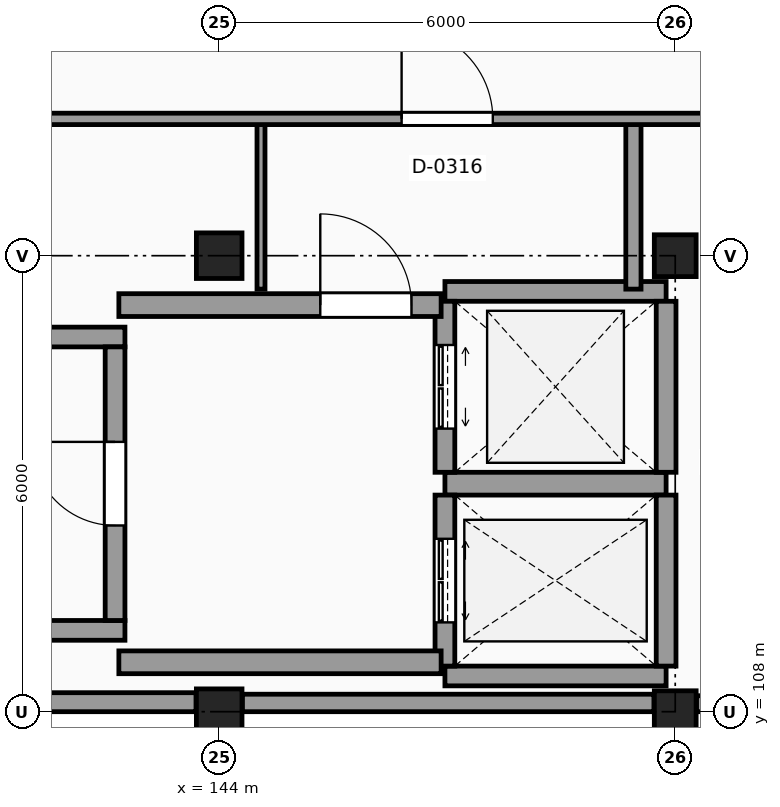
"""IFC4 building model, lengths in metres.
Left out: names, types, materials, properties, quantities, classifications, styles, units other than length and angle.
Written with IfcOpenShell. Run it as: python <this file> out.ifc"""

import sys

from ifc_helpers import new_model, si_unit, direction, frame, frame_2d, origin, origin_2d, place, context, subcontext, project, spatial, rectangle, extrude, element, fill, save


model = new_model("IFC4")
c1 = context("Model", 3, precision=1e-05, world=origin(), true_north=direction((0.0, 1.0)))
c2 = subcontext(c1, "Body", "Model", "MODEL_VIEW")
j1 = project(units=[si_unit("LENGTHUNIT", "METRE"), si_unit("PLANEANGLEUNIT", "RADIAN")], contexts=[c1])
p1 = place(None, origin())
s1 = spatial("IfcSite", under=j1, at=p1, CompositionType="ELEMENT")
p2 = place(p1, origin())
s2 = spatial("IfcBuilding", under=s1, at=p2, CompositionType="ELEMENT")
p3 = place(p2, frame((0.0, 0.0, 31.5)))
s3 = spatial("IfcBuildingStorey", under=s2, at=p3, CompositionType="ELEMENT", Elevation=31.5)
for number, where, z_axis, x_axis in (
    (1, (144.0, 108.0, 0.0), (0.0, 0.0, 1.0), (1.0, 0.0, 0.0)),
    (2, (144.0, 114.0, 0.0), (0.0, 0.0, 1.0), (1.0, 0.0, 0.0)),
):
    element("IfcColumn", number, at=place(p3, frame(where, z_axis=z_axis, x_axis=x_axis)), inside=s3, PredefinedType="COLUMN", context=c2, shape_type="SweptSolid", body=[
        extrude(rectangle(XDim=0.6, YDim=0.6, at=origin_2d()), origin(), (0.0, 0.0, 1.0), 3.3),
    ])
for number, where, z_axis, x_axis in (
    (3, (150.0, 108.0, 0.0), (0.0, 0.0, 1.0), (1.0, 0.0, 0.0)),
    (4, (150.0, 114.0, 0.0), (0.0, 0.0, 1.0), (1.0, 0.0, 0.0)),
):
    element("IfcColumn", number, at=place(p3, frame(where, z_axis=z_axis, x_axis=x_axis)), inside=s3, PredefinedType="COLUMN", context=c2, shape_type="SweptSolid", body=[
        extrude(rectangle(XDim=0.55, YDim=0.55, at=origin_2d()), origin(), (0.0, 0.0, 1.0), 3.3),
    ])
p4 = place(p3, frame((138.28, 108.125, 0.0), z_axis=(0.0, 0.0, 1.0), x_axis=(1.0, 0.0, 0.0)))
e5 = element("IfcWall", 5, at=p4, inside=s3, PredefinedType="SOLIDWALL", context=c2, shape_type="SweptSolid", body=[
    extrude(rectangle(XDim=5.415, YDim=0.25, at=frame_2d((2.708, 0.0))), origin(), (0.0, 0.0, 1.0), 2.42),
])
p5 = place(p3, frame((144.305, 108.115, 0.0), z_axis=(0.0, 0.0, 1.0), x_axis=(1.0, 0.0, 0.0)))
e6 = element("IfcWall", 6, at=p5, inside=s3, PredefinedType="SOLIDWALL", context=c2, shape_type="SweptSolid", body=[
    extrude(rectangle(XDim=5.415, YDim=0.23, at=frame_2d((2.708, 0.0))), origin(), (0.0, 0.0, 1.0), 2.42),
])
p6 = place(p3, frame((150.28, 108.105, 0.0), z_axis=(0.0, 0.0, 1.0), x_axis=(1.0, 0.0, 0.0)))
e7 = element("IfcWall", 7, at=p6, inside=s3, PredefinedType="SOLIDWALL", context=c2, shape_type="SweptSolid", body=[
    extrude(rectangle(XDim=5.415, YDim=0.21, at=frame_2d((2.708, 0.0))), origin(), (0.0, 0.0, 1.0), 2.42),
])
p7 = place(p6, frame((2.008, 0.0, 0.8)))
e8 = element("IfcOpeningElement", 8, at=p7, cuts=e7, PredefinedType="OPENING", context=c2, shape_type="SweptSolid", body=[
    extrude(rectangle(XDim=1.4, YDim=1.4, at=frame_2d((0.7, 0.7))), frame((0.0, 0.115, 0.0), z_axis=(0.0, -1.0, 0.0), x_axis=(1.0, 0.0, 0.0)), (0.0, 0.0, 1.0), 0.23),
])
for number, where, z_axis, x_axis in (
    (9, (132.04, 109.07, 0.0), (0.0, 0.0, 1.0), (1.0, 0.0, 0.0)),
    (10, (132.04, 112.93, 0.0), (0.0, 0.0, 1.0), (1.0, 0.0, 0.0)),
):
    element("IfcWall", number, at=place(p3, frame(where, z_axis=z_axis, x_axis=x_axis)), inside=s3, PredefinedType="SHEAR", context=c2, shape_type="SweptSolid", body=[
        extrude(rectangle(XDim=10.72, YDim=0.26, at=frame_2d((5.36, 0.0))), origin(), (0.0, 0.0, 1.0), 3.3),
    ])
p8 = place(p3, frame((142.63, 109.2, 0.0), z_axis=(0.0, 0.0, 1.0), x_axis=(0.0, 1.0, 0.0)))
e11 = element("IfcWall", 11, at=p8, inside=s3, PredefinedType="SHEAR", context=c2, shape_type="SweptSolid", body=[
    extrude(rectangle(XDim=3.6, YDim=0.26, at=frame_2d((1.8, 0.0))), origin(), (0.0, 0.0, 1.0), 3.3),
])
p9 = place(p8, frame((1.25, 0.0, 0.0)))
e12 = element("IfcOpeningElement", 12, at=p9, cuts=e11, PredefinedType="OPENING", context=c2, shape_type="SweptSolid", body=[
    extrude(rectangle(XDim=1.1, YDim=2.15, at=frame_2d((0.55, 1.075))), frame((0.0, 0.14, 0.0), z_axis=(0.0, -1.0, 0.0), x_axis=(1.0, 0.0, 0.0)), (0.0, 0.0, 1.0), 0.28),
])
p10 = place(p3, frame((146.97, 108.47, 0.0), z_axis=(0.0, 0.0, 1.0), x_axis=(1.0, 0.0, 0.0)))
e13 = element("IfcWall", 13, at=p10, inside=s3, PredefinedType="SHEAR", context=c2, shape_type="SweptSolid", body=[
    extrude(rectangle(XDim=2.91, YDim=0.26, at=frame_2d((1.455, 0.0))), origin(), (0.0, 0.0, 1.0), 3.3),
])
p11 = place(p3, frame((146.97, 111.0, 0.0), z_axis=(0.0, 0.0, 1.0), x_axis=(1.0, 0.0, 0.0)))
e14 = element("IfcWall", 14, at=p11, inside=s3, PredefinedType="SHEAR", context=c2, shape_type="SweptSolid", body=[
    extrude(rectangle(XDim=2.91, YDim=0.3, at=frame_2d((1.455, 0.0))), origin(), (0.0, 0.0, 1.0), 3.3),
])
p12 = place(p3, frame((149.88, 108.6, 0.0), z_axis=(0.0, 0.0, 1.0), x_axis=(0.0, 1.0, 0.0)))
e15 = element("IfcWall", 15, at=p12, inside=s3, PredefinedType="SHEAR", context=c2, shape_type="SweptSolid", body=[
    extrude(rectangle(XDim=2.25, YDim=0.26, at=frame_2d((1.125, 0.0))), origin(), (0.0, 0.0, 1.0), 3.3),
])
p13 = place(p3, frame((146.97, 108.6, 0.0), z_axis=(0.0, 0.0, 1.0), x_axis=(0.0, 1.0, 0.0)))
e16 = element("IfcWall", 16, at=p13, inside=s3, PredefinedType="SHEAR", context=c2, shape_type="SweptSolid", body=[
    extrude(rectangle(XDim=2.25, YDim=0.26, at=frame_2d((1.125, 0.0))), origin(), (0.0, 0.0, 1.0), 3.3),
])
p14 = place(p13, frame((0.575, 0.0, 0.0)))
e17 = element("IfcOpeningElement", 17, at=p14, cuts=e16, PredefinedType="OPENING", context=c2, shape_type="SweptSolid", body=[
    extrude(rectangle(XDim=1.1, YDim=2.2, at=frame_2d((0.55, 1.1))), frame((0.0, 0.14, 0.0), z_axis=(0.0, -1.0, 0.0), x_axis=(1.0, 0.0, 0.0)), (0.0, 0.0, 1.0), 0.28),
])
p15 = place(p3, frame((146.97, 113.53, 0.0), z_axis=(0.0, 0.0, 1.0), x_axis=(1.0, 0.0, 0.0)))
e18 = element("IfcWall", 18, at=p15, inside=s3, PredefinedType="SHEAR", context=c2, shape_type="SweptSolid", body=[
    extrude(rectangle(XDim=2.91, YDim=0.26, at=frame_2d((1.455, 0.0))), origin(), (0.0, 0.0, 1.0), 3.3),
])
p16 = place(p3, frame((149.88, 111.15, 0.0), z_axis=(0.0, 0.0, 1.0), x_axis=(0.0, 1.0, 0.0)))
e19 = element("IfcWall", 19, at=p16, inside=s3, PredefinedType="SHEAR", context=c2, shape_type="SweptSolid", body=[
    extrude(rectangle(XDim=2.25, YDim=0.26, at=frame_2d((1.125, 0.0))), origin(), (0.0, 0.0, 1.0), 3.3),
])
p17 = place(p3, frame((146.97, 111.15, 0.0), z_axis=(0.0, 0.0, 1.0), x_axis=(0.0, 1.0, 0.0)))
e20 = element("IfcWall", 20, at=p17, inside=s3, PredefinedType="SHEAR", context=c2, shape_type="SweptSolid", body=[
    extrude(rectangle(XDim=2.25, YDim=0.26, at=frame_2d((1.125, 0.0))), origin(), (0.0, 0.0, 1.0), 3.3),
])
p18 = place(p17, frame((0.575, 0.0, 0.0)))
e21 = element("IfcOpeningElement", 21, at=p18, cuts=e20, PredefinedType="OPENING", context=c2, shape_type="SweptSolid", body=[
    extrude(rectangle(XDim=1.1, YDim=2.2, at=frame_2d((0.55, 1.1))), frame((0.0, 0.14, 0.0), z_axis=(0.0, -1.0, 0.0), x_axis=(1.0, 0.0, 0.0)), (0.0, 0.0, 1.0), 0.28),
])
p19 = place(p3, frame((142.68, 113.35, 0.0), z_axis=(0.0, 0.0, 1.0), x_axis=(1.0, 0.0, 0.0)))
e22 = element("IfcWall", 22, at=p19, inside=s3, PredefinedType="SHEAR", context=c2, shape_type="SweptSolid", body=[
    extrude(rectangle(XDim=4.24, YDim=0.3, at=frame_2d((2.12, 0.0))), origin(), (0.0, 0.0, 1.0), 3.3),
])
p20 = place(p19, frame((2.65, 0.0, 0.0)))
e23 = element("IfcOpeningElement", 23, at=p20, cuts=e22, PredefinedType="OPENING", context=c2, shape_type="SweptSolid", body=[
    extrude(rectangle(XDim=1.2, YDim=2.2, at=frame_2d((0.6, 1.1))), frame((0.0, 0.16, 0.0), z_axis=(0.0, -1.0, 0.0), x_axis=(1.0, 0.0, 0.0)), (0.0, 0.0, 1.0), 0.32),
])
p21 = place(p3, frame((142.68, 108.65, 0.0), z_axis=(0.0, 0.0, 1.0), x_axis=(1.0, 0.0, 0.0)))
e24 = element("IfcWall", 24, at=p21, inside=s3, PredefinedType="SHEAR", context=c2, shape_type="SweptSolid", body=[
    extrude(rectangle(XDim=4.24, YDim=0.3, at=frame_2d((2.12, 0.0))), origin(), (0.0, 0.0, 1.0), 3.3),
])
p22 = place(p3, frame((144.55, 113.56, 0.0), z_axis=(0.0, 0.0, 1.0), x_axis=(0.0, 1.0, 0.0)))
e25 = element("IfcWall", 25, at=p22, inside=s3, PredefinedType="PARTITIONING", context=c2, shape_type="SweptSolid", body=[
    extrude(rectangle(XDim=2.24, YDim=0.105, at=frame_2d((1.12, 0.0))), origin(), (0.0, 0.0, 1.0), 3.07),
])
p23 = place(p3, frame((149.45, 113.56, 0.0), z_axis=(0.0, 0.0, 1.0), x_axis=(0.0, 1.0, 0.0)))
e26 = element("IfcWall", 26, at=p23, inside=s3, PredefinedType="PARTITIONING", context=c2, shape_type="SweptSolid", body=[
    extrude(rectangle(XDim=2.24, YDim=0.2, at=frame_2d((1.12, 0.0))), origin(), (0.0, 0.0, 1.0), 3.07),
])
p24 = place(p3, frame((66.215, 115.8, 0.0), z_axis=(0.0, 0.0, 1.0), x_axis=(1.0, 0.0, 0.0)))
e27 = element("IfcWall", 27, at=p24, inside=s3, PredefinedType="PARTITIONING", context=c2, shape_type="SweptSolid", body=[
    extrude(rectangle(XDim=103.585, YDim=0.15, at=frame_2d((51.792, 0.0))), origin(), (0.0, 0.0, 1.0), 3.07),
])
p25 = place(p24, frame((80.185, 0.0, 0.0)))
e28 = element("IfcOpeningElement", 28, at=p25, cuts=e27, PredefinedType="OPENING", context=c2, shape_type="SweptSolid", body=[
    extrude(rectangle(XDim=1.2, YDim=2.2, at=frame_2d((0.6, 1.1))), frame((0.0, 0.085, 0.0), z_axis=(0.0, -1.0, 0.0), x_axis=(1.0, 0.0, 0.0)), (0.0, 0.0, 1.0), 0.17),
])
p26 = place(p24, frame((50.185, 0.0, 0.0)))
e29 = element("IfcOpeningElement", 29, at=p26, cuts=e27, PredefinedType="OPENING", context=c2, shape_type="SweptSolid", body=[
    extrude(rectangle(XDim=1.2, YDim=2.2, at=frame_2d((0.6, 1.1))), frame((0.0, 0.085, 0.0), z_axis=(0.0, -1.0, 0.0), x_axis=(1.0, 0.0, 0.0)), (0.0, 0.0, 1.0), 0.17),
])
p27 = place(p24, frame((9.035, 0.0, 0.0)))
e30 = element("IfcOpeningElement", 30, at=p27, cuts=e27, PredefinedType="OPENING", context=c2, shape_type="SweptSolid", body=[
    extrude(rectangle(XDim=1.1, YDim=2.15, at=frame_2d((0.55, 1.075))), frame((0.0, 0.085, 0.0), z_axis=(0.0, -1.0, 0.0), x_axis=(1.0, 0.0, 0.0)), (0.0, 0.0, 1.0), 0.17),
])
p28 = place(p24, frame((55.335, 0.0, 0.0)))
e31 = element("IfcOpeningElement", 31, at=p28, cuts=e27, PredefinedType="OPENING", context=c2, shape_type="SweptSolid", body=[
    extrude(rectangle(XDim=1.0, YDim=2.15, at=frame_2d((0.5, 1.075))), frame((0.0, 0.085, 0.0), z_axis=(0.0, -1.0, 0.0), x_axis=(1.0, 0.0, 0.0)), (0.0, 0.0, 1.0), 0.17),
])
p29 = place(p24, frame((62.305, 0.0, 0.0)))
e32 = element("IfcOpeningElement", 32, at=p29, cuts=e27, PredefinedType="OPENING", context=c2, shape_type="SweptSolid", body=[
    extrude(rectangle(XDim=0.96, YDim=2.15, at=frame_2d((0.48, 1.075))), frame((0.0, 0.085, 0.0), z_axis=(0.0, -1.0, 0.0), x_axis=(1.0, 0.0, 0.0)), (0.0, 0.0, 1.0), 0.17),
])
p30 = place(p24, frame((31.985, 0.0, 0.0)))
e33 = element("IfcOpeningElement", 33, at=p30, cuts=e27, PredefinedType="OPENING", context=c2, shape_type="SweptSolid", body=[
    extrude(rectangle(XDim=1.6, YDim=2.25, at=frame_2d((0.8, 1.125))), frame((0.0, 0.085, 0.0), z_axis=(0.0, -1.0, 0.0), x_axis=(1.0, 0.0, 0.0)), (0.0, 0.0, 1.0), 0.17),
])
p31 = place(p24, frame((18.61, 0.0, 0.0)))
e34 = element("IfcOpeningElement", 34, at=p31, cuts=e27, PredefinedType="OPENING", context=c2, shape_type="SweptSolid", body=[
    extrude(rectangle(XDim=0.95, YDim=2.1, at=frame_2d((0.475, 1.05))), frame((0.0, 0.085, 0.0), z_axis=(0.0, -1.0, 0.0), x_axis=(1.0, 0.0, 0.0)), (0.0, 0.0, 1.0), 0.17),
])
p32 = place(p24, frame((84.51, 0.0, 0.0)))
e35 = element("IfcOpeningElement", 35, at=p32, cuts=e27, PredefinedType="OPENING", context=c2, shape_type="SweptSolid", body=[
    extrude(rectangle(XDim=0.95, YDim=2.1, at=frame_2d((0.475, 1.05))), frame((0.0, 0.085, 0.0), z_axis=(0.0, -1.0, 0.0), x_axis=(1.0, 0.0, 0.0)), (0.0, 0.0, 1.0), 0.17),
])
p33 = place(p9, origin())
e36 = element("IfcDoor", 36, at=p33, inside=s3, OperationType="SINGLE_SWING_RIGHT", PredefinedType="DOOR", context=c2, shape_type="SweptSolid", body=[
    extrude(rectangle(XDim=1.1, YDim=2.15, at=frame_2d((0.55, 1.075))), frame((0.0, 0.025, 0.0), z_axis=(0.0, -1.0, 0.0), x_axis=(1.0, 0.0, 0.0)), (0.0, 0.0, 1.0), 0.05),
])
fill(e12, e36)
p34 = place(p14, origin())
e37 = element("IfcDoor", 37, at=p34, inside=s3, OperationType="DOUBLE_DOOR_SLIDING", PredefinedType="DOOR", context=c2, shape_type="SweptSolid", body=[
    extrude(rectangle(XDim=1.1, YDim=2.2, at=frame_2d((0.55, 1.1))), frame((0.0, 0.025, 0.0), z_axis=(0.0, -1.0, 0.0), x_axis=(1.0, 0.0, 0.0)), (0.0, 0.0, 1.0), 0.05),
])
fill(e17, e37)
p35 = place(p18, origin())
e38 = element("IfcDoor", 38, at=p35, inside=s3, OperationType="DOUBLE_DOOR_SLIDING", PredefinedType="DOOR", context=c2, shape_type="SweptSolid", body=[
    extrude(rectangle(XDim=1.1, YDim=2.2, at=frame_2d((0.55, 1.1))), frame((0.0, 0.025, 0.0), z_axis=(0.0, -1.0, 0.0), x_axis=(1.0, 0.0, 0.0)), (0.0, 0.0, 1.0), 0.05),
])
fill(e21, e38)
p36 = place(p20, origin())
e39 = element("IfcDoor", 39, at=p36, inside=s3, OperationType="SINGLE_SWING_LEFT", PredefinedType="DOOR", context=c2, shape_type="SweptSolid", body=[
    extrude(rectangle(XDim=1.2, YDim=2.2, at=frame_2d((0.6, 1.1))), frame((0.0, 0.025, 0.0), z_axis=(0.0, -1.0, 0.0), x_axis=(1.0, 0.0, 0.0)), (0.0, 0.0, 1.0), 0.05),
])
fill(e23, e39)
p37 = place(p25, origin())
e40 = element("IfcDoor", 40, at=p37, inside=s3, OperationType="SINGLE_SWING_LEFT", PredefinedType="DOOR", context=c2, shape_type="SweptSolid", body=[
    extrude(rectangle(XDim=1.2, YDim=2.2, at=frame_2d((0.6, 1.1))), frame((0.0, 0.025, 0.0), z_axis=(0.0, -1.0, 0.0), x_axis=(1.0, 0.0, 0.0)), (0.0, 0.0, 1.0), 0.05),
])
fill(e28, e40)
save(model, sys.argv[1])
